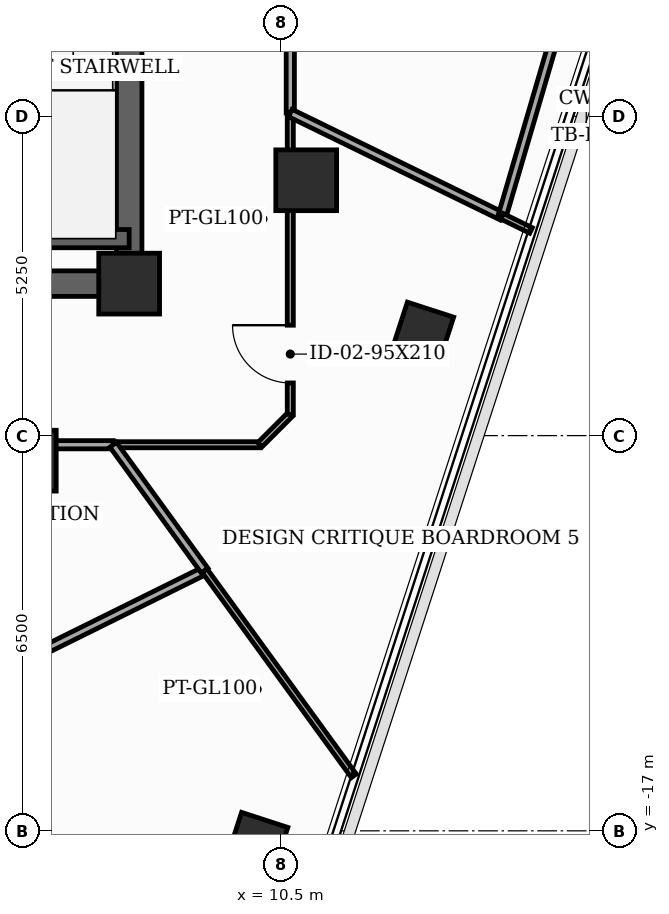
"""IFC4 building model, lengths in metres.
Left out: names, types, materials, properties, quantities, classifications, styles, units other than length and angle.
Written with IfcOpenShell. Run it as: python <this file> out.ifc"""

import sys

from ifc_helpers import new_model, si_unit, direction, frame, frame_2d, origin, origin_2d, place, context, subcontext, project, spatial, rectangle, extrude, element, fill, save


model = new_model("IFC4")
c1 = context("Model", 3, precision=1e-05, world=origin(), true_north=direction((0.0, 1.0)))
c2 = subcontext(c1, "Body", "Model", "MODEL_VIEW")
j1 = project(units=[si_unit("LENGTHUNIT", "METRE"), si_unit("PLANEANGLEUNIT", "RADIAN")], contexts=[c1])
p1 = place(None, origin())
s1 = spatial("IfcSite", under=j1, at=p1, CompositionType="ELEMENT")
p2 = place(p1, origin())
s2 = spatial("IfcBuilding", under=s1, at=p2, CompositionType="ELEMENT")
p3 = place(p2, frame((0.0, 0.0, 294.3)))
s3 = spatial("IfcBuildingStorey", under=s2, at=p3, CompositionType="ELEMENT", Elevation=294.3)
for number, where, z_axis, x_axis in (
    (1, (8.0, -8.0, 0.0), (0.0, 0.0, 1.0), (1.0, 0.0, 0.0)),
    (2, (6.3, -10.912, 0.0), (0.0, 0.0, 1.0), (1.0, 0.0, 0.0)),
    (3, (10.912, -6.3, 0.0), (0.0, 0.0, 1.0), (1.0, 0.0, 0.0)),
):
    element("IfcColumn", number, at=place(p3, frame(where, z_axis=z_axis, x_axis=x_axis)), inside=s3, PredefinedType="COLUMN", context=c2, shape_type="SweptSolid", body=[
        extrude(rectangle(XDim=1.0, YDim=1.0, at=origin_2d()), origin(), (0.0, 0.0, 1.0), 3.7),
    ])
for number, where, z_axis, x_axis in (
    (4, (10.106, -17.201, 0.0), (0.0, 0.0, 1.0), (0.309, 0.951, 0.0)),
    (5, (12.833, -8.809, 0.0), (0.0, 0.0, 1.0), (0.309, 0.951, 0.0)),
):
    element("IfcColumn", number, at=place(p3, frame(where, z_axis=z_axis, x_axis=x_axis)), inside=s3, PredefinedType="COLUMN", context=c2, shape_type="SweptSolid", body=[
        extrude(rectangle(XDim=0.8, YDim=0.8, at=origin_2d()), origin(), (0.0, 0.0, 1.0), 3.7),
    ])
p4 = place(p3, frame((8.0, -8.0, 0.0), z_axis=(0.0, 0.0, 1.0), x_axis=(0.0, 1.0, 0.0)))
e6 = element("IfcWall", 6, at=p4, inside=s3, PredefinedType="SHEAR", context=c2, shape_type="SweptSolid", body=[
    extrude(rectangle(XDim=16.0, YDim=0.42, at=frame_2d((8.0, 0.0))), origin(), (0.0, 0.0, 1.0), 3.5),
])
p5 = place(p4, frame((9.6, 0.0, 0.0)))
e7 = element("IfcOpeningElement", 7, at=p5, cuts=e6, PredefinedType="OPENING", context=c2, shape_type="SweptSolid", body=[
    extrude(rectangle(XDim=1.05, YDim=2.15, at=frame_2d((0.525, 1.075))), frame((0.0, 0.22, 0.0), z_axis=(0.0, -1.0, 0.0), x_axis=(1.0, 0.0, 0.0)), (0.0, 0.0, 1.0), 0.44),
])
p6 = place(p4, frame((14.469, 0.0, 0.0)))
e8 = element("IfcOpeningElement", 8, at=p6, cuts=e6, PredefinedType="OPENING", context=c2, shape_type="SweptSolid", body=[
    extrude(rectangle(XDim=0.85, YDim=2.02, at=frame_2d((0.425, 1.01))), frame((0.0, 0.22, 0.0), z_axis=(0.0, -1.0, 0.0), x_axis=(1.0, 0.0, 0.0)), (0.0, 0.0, 1.0), 0.44),
])
p7 = place(p3, frame((-8.0, -8.0, 0.0), z_axis=(0.0, 0.0, 1.0), x_axis=(1.0, 0.0, 0.0)))
e9 = element("IfcWall", 9, at=p7, inside=s3, PredefinedType="SHEAR", context=c2, shape_type="SweptSolid", body=[
    extrude(rectangle(XDim=16.0, YDim=0.42, at=frame_2d((8.0, 0.0))), origin(), (0.0, 0.0, 1.0), 3.5),
])
p8 = place(p7, frame((5.2, 0.0, 0.0)))
e10 = element("IfcOpeningElement", 10, at=p8, cuts=e9, PredefinedType="OPENING", context=c2, shape_type="SweptSolid", body=[
    extrude(rectangle(XDim=0.95, YDim=2.1, at=frame_2d((0.475, 1.05))), frame((0.0, 0.22, 0.0), z_axis=(0.0, -1.0, 0.0), x_axis=(1.0, 0.0, 0.0)), (0.0, 0.0, 1.0), 0.44),
])
p9 = place(p7, frame((9.8, 0.0, 0.0)))
e11 = element("IfcOpeningElement", 11, at=p9, cuts=e9, PredefinedType="OPENING", context=c2, shape_type="SweptSolid", body=[
    extrude(rectangle(XDim=0.95, YDim=2.1, at=frame_2d((0.475, 1.05))), frame((0.0, 0.22, 0.0), z_axis=(0.0, -1.0, 0.0), x_axis=(1.0, 0.0, 0.0)), (0.0, 0.0, 1.0), 0.44),
])
p10 = place(p3, frame((4.45, -7.26, 0.0), z_axis=(0.0, 0.0, 1.0), x_axis=(1.0, 0.0, 0.0)))
e12 = element("IfcWall", 12, at=p10, inside=s3, PredefinedType="SHEAR", context=c2, shape_type="SweptSolid", body=[
    extrude(rectangle(XDim=3.55, YDim=0.3, at=frame_2d((1.775, 0.0))), origin(), (0.0, 0.0, 1.0), 3.5),
])
p11 = place(p3, frame((10.65, -5.194, 0.0), z_axis=(0.0, 0.0, 1.0), x_axis=(0.0, 1.0, 0.0)))
e13 = element("IfcWall", 13, at=p11, inside=s3, PredefinedType="PARTITIONING", context=c2, shape_type="SweptSolid", body=[
    extrude(rectangle(XDim=6.676, YDim=0.135, at=frame_2d((3.338, 0.0))), origin(), (0.0, 0.0, 1.0), 2.885),
])
p12 = place(p11, frame((2.863, 0.0, 0.0)))
e14 = element("IfcOpeningElement", 14, at=p12, cuts=e13, PredefinedType="OPENING", context=c2, shape_type="SweptSolid", body=[
    extrude(rectangle(XDim=0.95, YDim=2.1, at=frame_2d((0.475, 1.05))), frame((0.0, 0.077, 0.0), z_axis=(0.0, -1.0, 0.0), x_axis=(1.0, 0.0, 0.0)), (0.0, 0.0, 1.0), 0.155),
])
p13 = place(p3, frame((2.45, -10.65, 0.0), z_axis=(0.0, 0.0, 1.0), x_axis=(1.0, 0.0, 0.0)))
e15 = element("IfcWall", 15, at=p13, inside=s3, PredefinedType="PARTITIONING", context=c2, shape_type="SweptSolid", body=[
    extrude(rectangle(XDim=5.288, YDim=0.135, at=frame_2d((2.644, 0.0))), origin(), (0.0, 0.0, 1.0), 2.885),
])
p14 = place(p13, frame((0.583, 0.0, 0.0)))
e16 = element("IfcOpeningElement", 16, at=p14, cuts=e15, PredefinedType="OPENING", context=c2, shape_type="SweptSolid", body=[
    extrude(rectangle(XDim=0.95, YDim=2.1, at=frame_2d((0.475, 1.05))), frame((0.0, 0.077, 0.0), z_axis=(0.0, -1.0, 0.0), x_axis=(1.0, 0.0, 0.0)), (0.0, 0.0, 1.0), 0.155),
])
p15 = place(p3, frame((7.738, -10.65, 0.0), z_axis=(0.0, 0.0, 1.0), x_axis=(1.0, 0.0, 0.0)))
e17 = element("IfcWall", 17, at=p15, inside=s3, PredefinedType="MOVABLE", context=c2, shape_type="SweptSolid", body=[
    extrude(rectangle(XDim=2.412, YDim=0.1, at=frame_2d((1.206, 0.0))), origin(), (0.0, 0.0, 1.0), 3.5),
])
p16 = place(p3, frame((10.15, -10.65, 0.0), z_axis=(0.0, 0.0, 1.0), x_axis=(0.707106781187, 0.707106781187, 0.0)))
e18 = element("IfcWall", 18, at=p16, inside=s3, PredefinedType="MOVABLE", context=c2, shape_type="SweptSolid", body=[
    extrude(rectangle(XDim=0.707, YDim=0.1, at=frame_2d((0.354, 0.0))), origin(), (0.0, 0.0, 1.0), 3.5),
])
p17 = place(p3, frame((10.65, -10.15, 0.0), z_axis=(0.0, 0.0, 1.0), x_axis=(0.0, 1.0, 0.0)))
e19 = element("IfcWall", 19, at=p17, inside=s3, PredefinedType="MOVABLE", context=c2, shape_type="SweptSolid", body=[
    extrude(rectangle(XDim=4.956, YDim=0.1, at=frame_2d((2.478, 0.0))), origin(), (0.0, 0.0, 1.0), 2.885),
])
p18 = place(p17, frame((0.516, 0.0, 0.0)))
e20 = element("IfcOpeningElement", 20, at=p18, cuts=e19, PredefinedType="OPENING", context=c2, shape_type="SweptSolid", body=[
    extrude(rectangle(XDim=0.95, YDim=2.1, at=frame_2d((0.475, 1.05))), frame((0.0, 0.06, 0.0), z_axis=(0.0, -1.0, 0.0), x_axis=(1.0, 0.0, 0.0)), (0.0, 0.0, 1.0), 0.12),
])
p19 = place(p3, frame((10.65, -5.194, 0.0), z_axis=(0.0, 0.0, 1.0), x_axis=(0.898781159743, -0.438397567159, 0.0)))
e21 = element("IfcWall", 21, at=p19, inside=s3, PredefinedType="PARTITIONING", context=c2, shape_type="SweptSolid", body=[
    extrude(rectangle(XDim=3.875, YDim=0.135, at=frame_2d((1.938, 0.0))), origin(), (0.0, 0.0, 1.0), 2.885),
])
p20 = place(p3, frame((14.133, -6.893, 0.0), z_axis=(0.0, 0.0, 1.0), x_axis=(0.281231672123, 0.959639904649, 0.0)))
e22 = element("IfcWall", 22, at=p20, inside=s3, PredefinedType="PARTITIONING", context=c2, shape_type="SweptSolid", body=[
    extrude(rectangle(XDim=5.7, YDim=0.135, at=frame_2d((2.85, 0.0))), origin(), (0.0, 0.0, 1.0), 3.5),
])
p21 = place(p3, frame((4.134, -15.25, 0.0), z_axis=(0.0, 0.0, 1.0), x_axis=(0.896167979159, 0.443714945804, 0.0)))
e23 = element("IfcWall", 23, at=p21, inside=s3, PredefinedType="PARTITIONING", context=c2, shape_type="SweptSolid", body=[
    extrude(rectangle(XDim=5.7, YDim=0.135, at=frame_2d((2.85, 0.0))), origin(), (0.0, 0.0, 1.0), 3.035),
])
p22 = place(p3, frame((9.242, -12.721, 0.0), z_axis=(0.0, 0.0, 1.0), x_axis=(-0.58758169089, 0.80916485127, 0.0)))
e24 = element("IfcWall", 24, at=p22, inside=s3, PredefinedType="PARTITIONING", context=c2, shape_type="SweptSolid", body=[
    extrude(rectangle(XDim=2.56, YDim=0.135, at=frame_2d((1.28, 0.0))), origin(), (0.0, 0.0, 1.0), 3.5),
])
p23 = place(p3, frame((11.695, -16.096, 0.0), z_axis=(0.0, 0.0, 1.0), x_axis=(-0.587938546927, 0.808905597111, 0.0)))
e25 = element("IfcWall", 25, at=p23, inside=s3, PredefinedType="MOVABLE", context=c2, shape_type="SweptSolid", body=[
    extrude(rectangle(XDim=4.172, YDim=0.1, at=frame_2d((2.086, 0.0))), origin(), (0.0, 0.0, 1.0), 3.035),
])
p24 = place(p3, frame((14.609, -7.126, 0.0), z_axis=(0.0, 0.0, 1.0), x_axis=(-0.898533726223, 0.438904480313, 0.0)))
e26 = element("IfcWall", 26, at=p24, inside=s3, PredefinedType="MOVABLE", context=c2, shape_type="SweptSolid", body=[
    extrude(rectangle(XDim=0.53, YDim=0.1, at=frame_2d((0.265, 0.0))), origin(), (0.0, 0.0, 1.0), 3.5),
])
p25 = place(p18, origin())
e27 = element("IfcDoor", 27, at=p25, inside=s3, OperationType="SINGLE_SWING_RIGHT", PredefinedType="DOOR", context=c2, shape_type="SweptSolid", body=[
    extrude(rectangle(XDim=0.95, YDim=2.1, at=frame_2d((0.475, 1.05))), frame((0.0, 0.025, 0.0), z_axis=(0.0, -1.0, 0.0), x_axis=(1.0, 0.0, 0.0)), (0.0, 0.0, 1.0), 0.05),
])
fill(e20, e27)
save(model, sys.argv[1])
